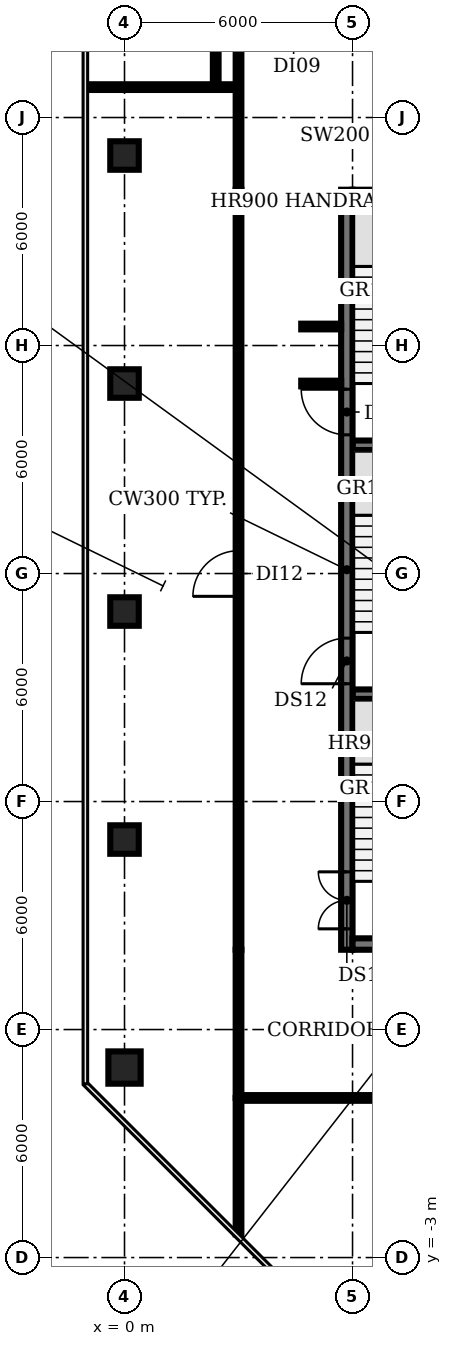
"""IFC4 building model, lengths in metres.
Left out: names, types, materials, properties, quantities, classifications, styles, units other than length and angle.
Written with IfcOpenShell. Run it as: python <this file> out.ifc"""

import sys

from ifc_helpers import new_model, si_unit, direction, frame, frame_2d, origin, origin_2d, place, context, subcontext, project, spatial, rectangle, circle, extrude, element, fill, save


model = new_model("IFC4")
c1 = context("Model", 3, precision=1e-05, world=origin(), true_north=direction((0.0, 1.0)))
c2 = subcontext(c1, "Body", "Model", "MODEL_VIEW")
j1 = project(units=[si_unit("LENGTHUNIT", "METRE"), si_unit("PLANEANGLEUNIT", "RADIAN")], contexts=[c1])
p1 = place(None, origin())
s1 = spatial("IfcSite", under=j1, at=p1, CompositionType="ELEMENT")
p2 = place(p1, origin())
s2 = spatial("IfcBuilding", under=s1, at=p2, CompositionType="ELEMENT")
p3 = place(p2, frame((0.0, 0.0, 302.0)))
s3 = spatial("IfcBuildingStorey", under=s2, at=p3, CompositionType="ELEMENT", Elevation=302.0)
p4 = place(p3, frame((0.0, 2.0, 0.0), z_axis=(0.0, 0.0, 1.0), x_axis=(1.0, 0.0, 0.0)))
e1 = element("IfcColumn", 1, at=p4, inside=s3, PredefinedType="COLUMN", context=c2, shape_type="SweptSolid", body=[
    extrude(circle(Radius=0.425, at=origin_2d()), origin(), (0.0, 0.0, 1.0), 3.85),
])
for number, where, z_axis, x_axis in (
    (2, (0.0, 8.0, 0.0), (0.0, 0.0, 1.0), (1.0, 0.0, 0.0)),
    (3, (0.0, 14.0, 0.0), (0.0, 0.0, 1.0), (1.0, 0.0, 0.0)),
    (4, (0.0, 20.0, 0.0), (0.0, 0.0, 1.0), (1.0, 0.0, 0.0)),
    (5, (0.0, 26.0, 0.0), (0.0, 0.0, 1.0), (1.0, 0.0, 0.0)),
):
    element("IfcColumn", number, at=place(p3, frame(where, z_axis=z_axis, x_axis=x_axis)), inside=s3, PredefinedType="COLUMN", context=c2, shape_type="SweptSolid", body=[
        extrude(rectangle(XDim=0.75, YDim=0.75, at=origin_2d()), origin(), (0.0, 0.0, 1.0), 3.85),
    ])
for number, where, z_axis, x_axis in (
    (6, (6.0, 11.825, 0.0), (0.0, 0.0, 1.0), (1.0, 0.0, 0.0)),
    (7, (6.0, 18.375, 0.0), (0.0, 0.0, 1.0), (1.0, 0.0, 0.0)),
):
    element("IfcWall", number, at=place(p3, frame(where, z_axis=z_axis, x_axis=x_axis)), inside=s3, PredefinedType="SHEAR", context=c2, shape_type="SweptSolid", body=[
        extrude(rectangle(XDim=3.15, YDim=0.25, at=frame_2d((1.575, 0.0))), origin(), (0.0, 0.0, 1.0), 3.85),
    ])
p5 = place(p3, frame((5.85, 5.1, 0.0), z_axis=(0.0, 0.0, 1.0), x_axis=(0.0, 1.0, 0.0)))
e8 = element("IfcWall", 8, at=p5, inside=s3, PredefinedType="SHEAR", context=c2, shape_type="SweptSolid", body=[
    extrude(rectangle(XDim=20.0, YDim=0.3, at=frame_2d((10.0, 0.0))), origin(), (0.0, 0.0, 1.0), 3.85),
])
p6 = place(p5, frame((0.55, 0.0, 0.0)))
e9 = element("IfcOpeningElement", 9, at=p6, cuts=e8, PredefinedType="OPENING", context=c2, shape_type="SweptSolid", body=[
    extrude(rectangle(XDim=1.5, YDim=2.1, at=frame_2d((0.75, 1.05))), frame((0.0, 0.16, 0.0), z_axis=(0.0, -1.0, 0.0), x_axis=(1.0, 0.0, 0.0)), (0.0, 0.0, 1.0), 0.32),
])
p7 = place(p5, frame((7.0, 0.0, 0.0)))
e10 = element("IfcOpeningElement", 10, at=p7, cuts=e8, PredefinedType="OPENING", context=c2, shape_type="SweptSolid", body=[
    extrude(rectangle(XDim=1.2, YDim=2.1, at=frame_2d((0.6, 1.05))), frame((0.0, 0.16, 0.0), z_axis=(0.0, -1.0, 0.0), x_axis=(1.0, 0.0, 0.0)), (0.0, 0.0, 1.0), 0.32),
])
p8 = place(p5, frame((13.55, 0.0, 0.0)))
e11 = element("IfcOpeningElement", 11, at=p8, cuts=e8, PredefinedType="OPENING", context=c2, shape_type="SweptSolid", body=[
    extrude(rectangle(XDim=1.2, YDim=2.1, at=frame_2d((0.6, 1.05))), frame((0.0, 0.16, 0.0), z_axis=(0.0, -1.0, 0.0), x_axis=(1.0, 0.0, 0.0)), (0.0, 0.0, 1.0), 0.32),
])
p9 = place(p3, frame((24.0, 5.25, 0.0), z_axis=(0.0, 0.0, 1.0), x_axis=(-1.0, 0.0, 0.0)))
e12 = element("IfcWall", 12, at=p9, inside=s3, PredefinedType="SHEAR", context=c2, shape_type="SweptSolid", body=[
    extrude(rectangle(XDim=18.0, YDim=0.3, at=frame_2d((9.0, 0.0))), origin(), (0.0, 0.0, 1.0), 3.85),
])
p10 = place(p9, frame((13.0, 0.0, 0.0)))
e13 = element("IfcOpeningElement", 13, at=p10, cuts=e12, PredefinedType="OPENING", context=c2, shape_type="SweptSolid", body=[
    extrude(rectangle(XDim=1.2, YDim=2.1, at=frame_2d((0.6, 1.05))), frame((0.0, 0.16, 0.0), z_axis=(0.0, -1.0, 0.0), x_axis=(1.0, 0.0, 0.0)), (0.0, 0.0, 1.0), 0.32),
])
p11 = place(p9, frame((4.9, 0.0, 0.0)))
e14 = element("IfcOpeningElement", 14, at=p11, cuts=e12, PredefinedType="OPENING", context=c2, shape_type="SweptSolid", body=[
    extrude(rectangle(XDim=1.0, YDim=2.1, at=frame_2d((0.5, 1.05))), frame((0.0, 0.16, 0.0), z_axis=(0.0, -1.0, 0.0), x_axis=(1.0, 0.0, 0.0)), (0.0, 0.0, 1.0), 0.32),
])
p12 = place(p3, frame((6.0, 24.95, 0.0), z_axis=(0.0, 0.0, 1.0), x_axis=(1.0, 0.0, 0.0)))
e15 = element("IfcWall", 15, at=p12, inside=s3, PredefinedType="SHEAR", context=c2, shape_type="SweptSolid", body=[
    extrude(rectangle(XDim=18.0, YDim=0.3, at=frame_2d((9.0, 0.0))), origin(), (0.0, 0.0, 1.0), 3.85),
])
p13 = place(p3, frame((-0.98, 27.8, 0.0), z_axis=(0.0, 0.0, 1.0), x_axis=(1.0, 0.0, 0.0)))
e16 = element("IfcWall", 16, at=p13, inside=s3, PredefinedType="PARTITIONING", context=c2, shape_type="SweptSolid", body=[
    extrude(rectangle(XDim=3.98, YDim=0.15, at=frame_2d((1.99, 0.0))), origin(), (0.0, 0.0, 1.0), 2.9),
])
p14 = place(p3, frame((2.4, 27.8, 0.0), z_axis=(0.0, 0.0, 1.0), x_axis=(0.0, 1.0, 0.0)))
e17 = element("IfcWall", 17, at=p14, inside=s3, PredefinedType="PARTITIONING", context=c2, shape_type="SweptSolid", body=[
    extrude(rectangle(XDim=6.0, YDim=0.15, at=frame_2d((3.0, 0.0))), origin(), (0.0, 0.0, 1.0), 2.9),
])
p15 = place(p3, frame((3.0, -2.39, 0.0), z_axis=(0.0, 0.0, 1.0), x_axis=(0.0, 1.0, 0.0)))
e18 = element("IfcWall", 18, at=p15, inside=s3, PredefinedType="PARTITIONING", context=c2, shape_type="SweptSolid", body=[
    extrude(rectangle(XDim=3.59, YDim=0.15, at=frame_2d((1.795, 0.0))), origin(), (0.0, 0.0, 1.0), 2.9),
])
p16 = place(p3, frame((3.0, 1.2, 0.0), z_axis=(0.0, 0.0, 1.0), x_axis=(0.0, 1.0, 0.0)))
e19 = element("IfcWall", 19, at=p16, inside=s3, PredefinedType="PARTITIONING", context=c2, shape_type="SweptSolid", body=[
    extrude(rectangle(XDim=3.9, YDim=0.15, at=frame_2d((1.95, 0.0))), origin(), (0.0, 0.0, 1.0), 2.9),
])
p17 = place(p3, frame((3.0, 5.1, 0.0), z_axis=(0.0, 0.0, 1.0), x_axis=(0.0, 1.0, 0.0)))
e20 = element("IfcWall", 20, at=p17, inside=s3, PredefinedType="PARTITIONING", context=c2, shape_type="SweptSolid", body=[
    extrude(rectangle(XDim=20.0, YDim=0.15, at=frame_2d((10.0, 0.0))), origin(), (0.0, 0.0, 1.0), 2.9),
])
p18 = place(p17, frame((9.3, 0.0, 0.0)))
e21 = element("IfcOpeningElement", 21, at=p18, cuts=e20, PredefinedType="OPENING", context=c2, shape_type="SweptSolid", body=[
    extrude(rectangle(XDim=1.2, YDim=2.1, at=frame_2d((0.6, 1.05))), frame((0.0, 0.085, 0.0), z_axis=(0.0, -1.0, 0.0), x_axis=(1.0, 0.0, 0.0)), (0.0, 0.0, 1.0), 0.17),
])
p19 = place(p3, frame((3.0, 25.1, 0.0), z_axis=(0.0, 0.0, 1.0), x_axis=(0.0, 1.0, 0.0)))
e22 = element("IfcWall", 22, at=p19, inside=s3, PredefinedType="PARTITIONING", context=c2, shape_type="SweptSolid", body=[
    extrude(rectangle(XDim=3.9, YDim=0.15, at=frame_2d((1.95, 0.0))), origin(), (0.0, 0.0, 1.0), 2.9),
])
for number, where, z_axis, x_axis in (
    (23, (4.65, 20.0, 0.0), (0.0, 0.0, 1.0), (1.0, 0.0, 0.0)),
    (24, (4.65, 21.5, 0.0), (0.0, 0.0, 1.0), (1.0, 0.0, 0.0)),
):
    element("IfcWall", number, at=place(p3, frame(where, z_axis=z_axis, x_axis=x_axis)), inside=s3, PredefinedType="PARTITIONING", context=c2, shape_type="SweptSolid", body=[
        extrude(rectangle(XDim=1.05, YDim=0.15, at=frame_2d((0.525, 0.0))), origin(), (0.0, 0.0, 1.0), 2.9),
    ])
p20 = place(p3, frame((27.0, 1.2, 0.0), z_axis=(0.0, 0.0, 1.0), x_axis=(-1.0, 0.0, 0.0)))
e25 = element("IfcWall", 25, at=p20, inside=s3, PredefinedType="PARTITIONING", context=c2, shape_type="SweptSolid", body=[
    extrude(rectangle(XDim=24.0, YDim=0.15, at=frame_2d((12.0, 0.0))), origin(), (0.0, 0.0, 1.0), 2.9),
])
p21 = place(p20, frame((11.5, 0.0, 0.0)))
e26 = element("IfcOpeningElement", 26, at=p21, cuts=e25, PredefinedType="OPENING", context=c2, shape_type="SweptSolid", body=[
    extrude(rectangle(XDim=1.2, YDim=2.1, at=frame_2d((0.6, 1.05))), frame((0.0, 0.085, 0.0), z_axis=(0.0, -1.0, 0.0), x_axis=(1.0, 0.0, 0.0)), (0.0, 0.0, 1.0), 0.17),
])
p22 = place(p6, origin())
e27 = element("IfcDoor", 27, at=p22, inside=s3, OperationType="DOUBLE_DOOR_SINGLE_SWING", PredefinedType="DOOR", context=c2, shape_type="SweptSolid", body=[
    extrude(rectangle(XDim=1.5, YDim=2.1, at=frame_2d((0.75, 1.05))), frame((0.0, 0.025, 0.0), z_axis=(0.0, -1.0, 0.0), x_axis=(1.0, 0.0, 0.0)), (0.0, 0.0, 1.0), 0.05),
])
fill(e9, e27)
p23 = place(p7, origin())
e28 = element("IfcDoor", 28, at=p23, inside=s3, OperationType="SINGLE_SWING_LEFT", PredefinedType="DOOR", context=c2, shape_type="SweptSolid", body=[
    extrude(rectangle(XDim=1.2, YDim=2.1, at=frame_2d((0.6, 1.05))), frame((0.0, 0.025, 0.0), z_axis=(0.0, -1.0, 0.0), x_axis=(1.0, 0.0, 0.0)), (0.0, 0.0, 1.0), 0.05),
])
fill(e10, e28)
p24 = place(p8, origin())
e29 = element("IfcDoor", 29, at=p24, inside=s3, OperationType="SINGLE_SWING_RIGHT", PredefinedType="DOOR", context=c2, shape_type="SweptSolid", body=[
    extrude(rectangle(XDim=1.2, YDim=2.1, at=frame_2d((0.6, 1.05))), frame((0.0, 0.025, 0.0), z_axis=(0.0, -1.0, 0.0), x_axis=(1.0, 0.0, 0.0)), (0.0, 0.0, 1.0), 0.05),
])
fill(e11, e29)
p25 = place(p18, origin())
e30 = element("IfcDoor", 30, at=p25, inside=s3, OperationType="SINGLE_SWING_LEFT", PredefinedType="DOOR", context=c2, shape_type="SweptSolid", body=[
    extrude(rectangle(XDim=1.2, YDim=2.1, at=frame_2d((0.6, 1.05))), frame((0.0, 0.025, 0.0), z_axis=(0.0, -1.0, 0.0), x_axis=(1.0, 0.0, 0.0)), (0.0, 0.0, 1.0), 0.05),
])
fill(e21, e30)
save(model, sys.argv[1])
